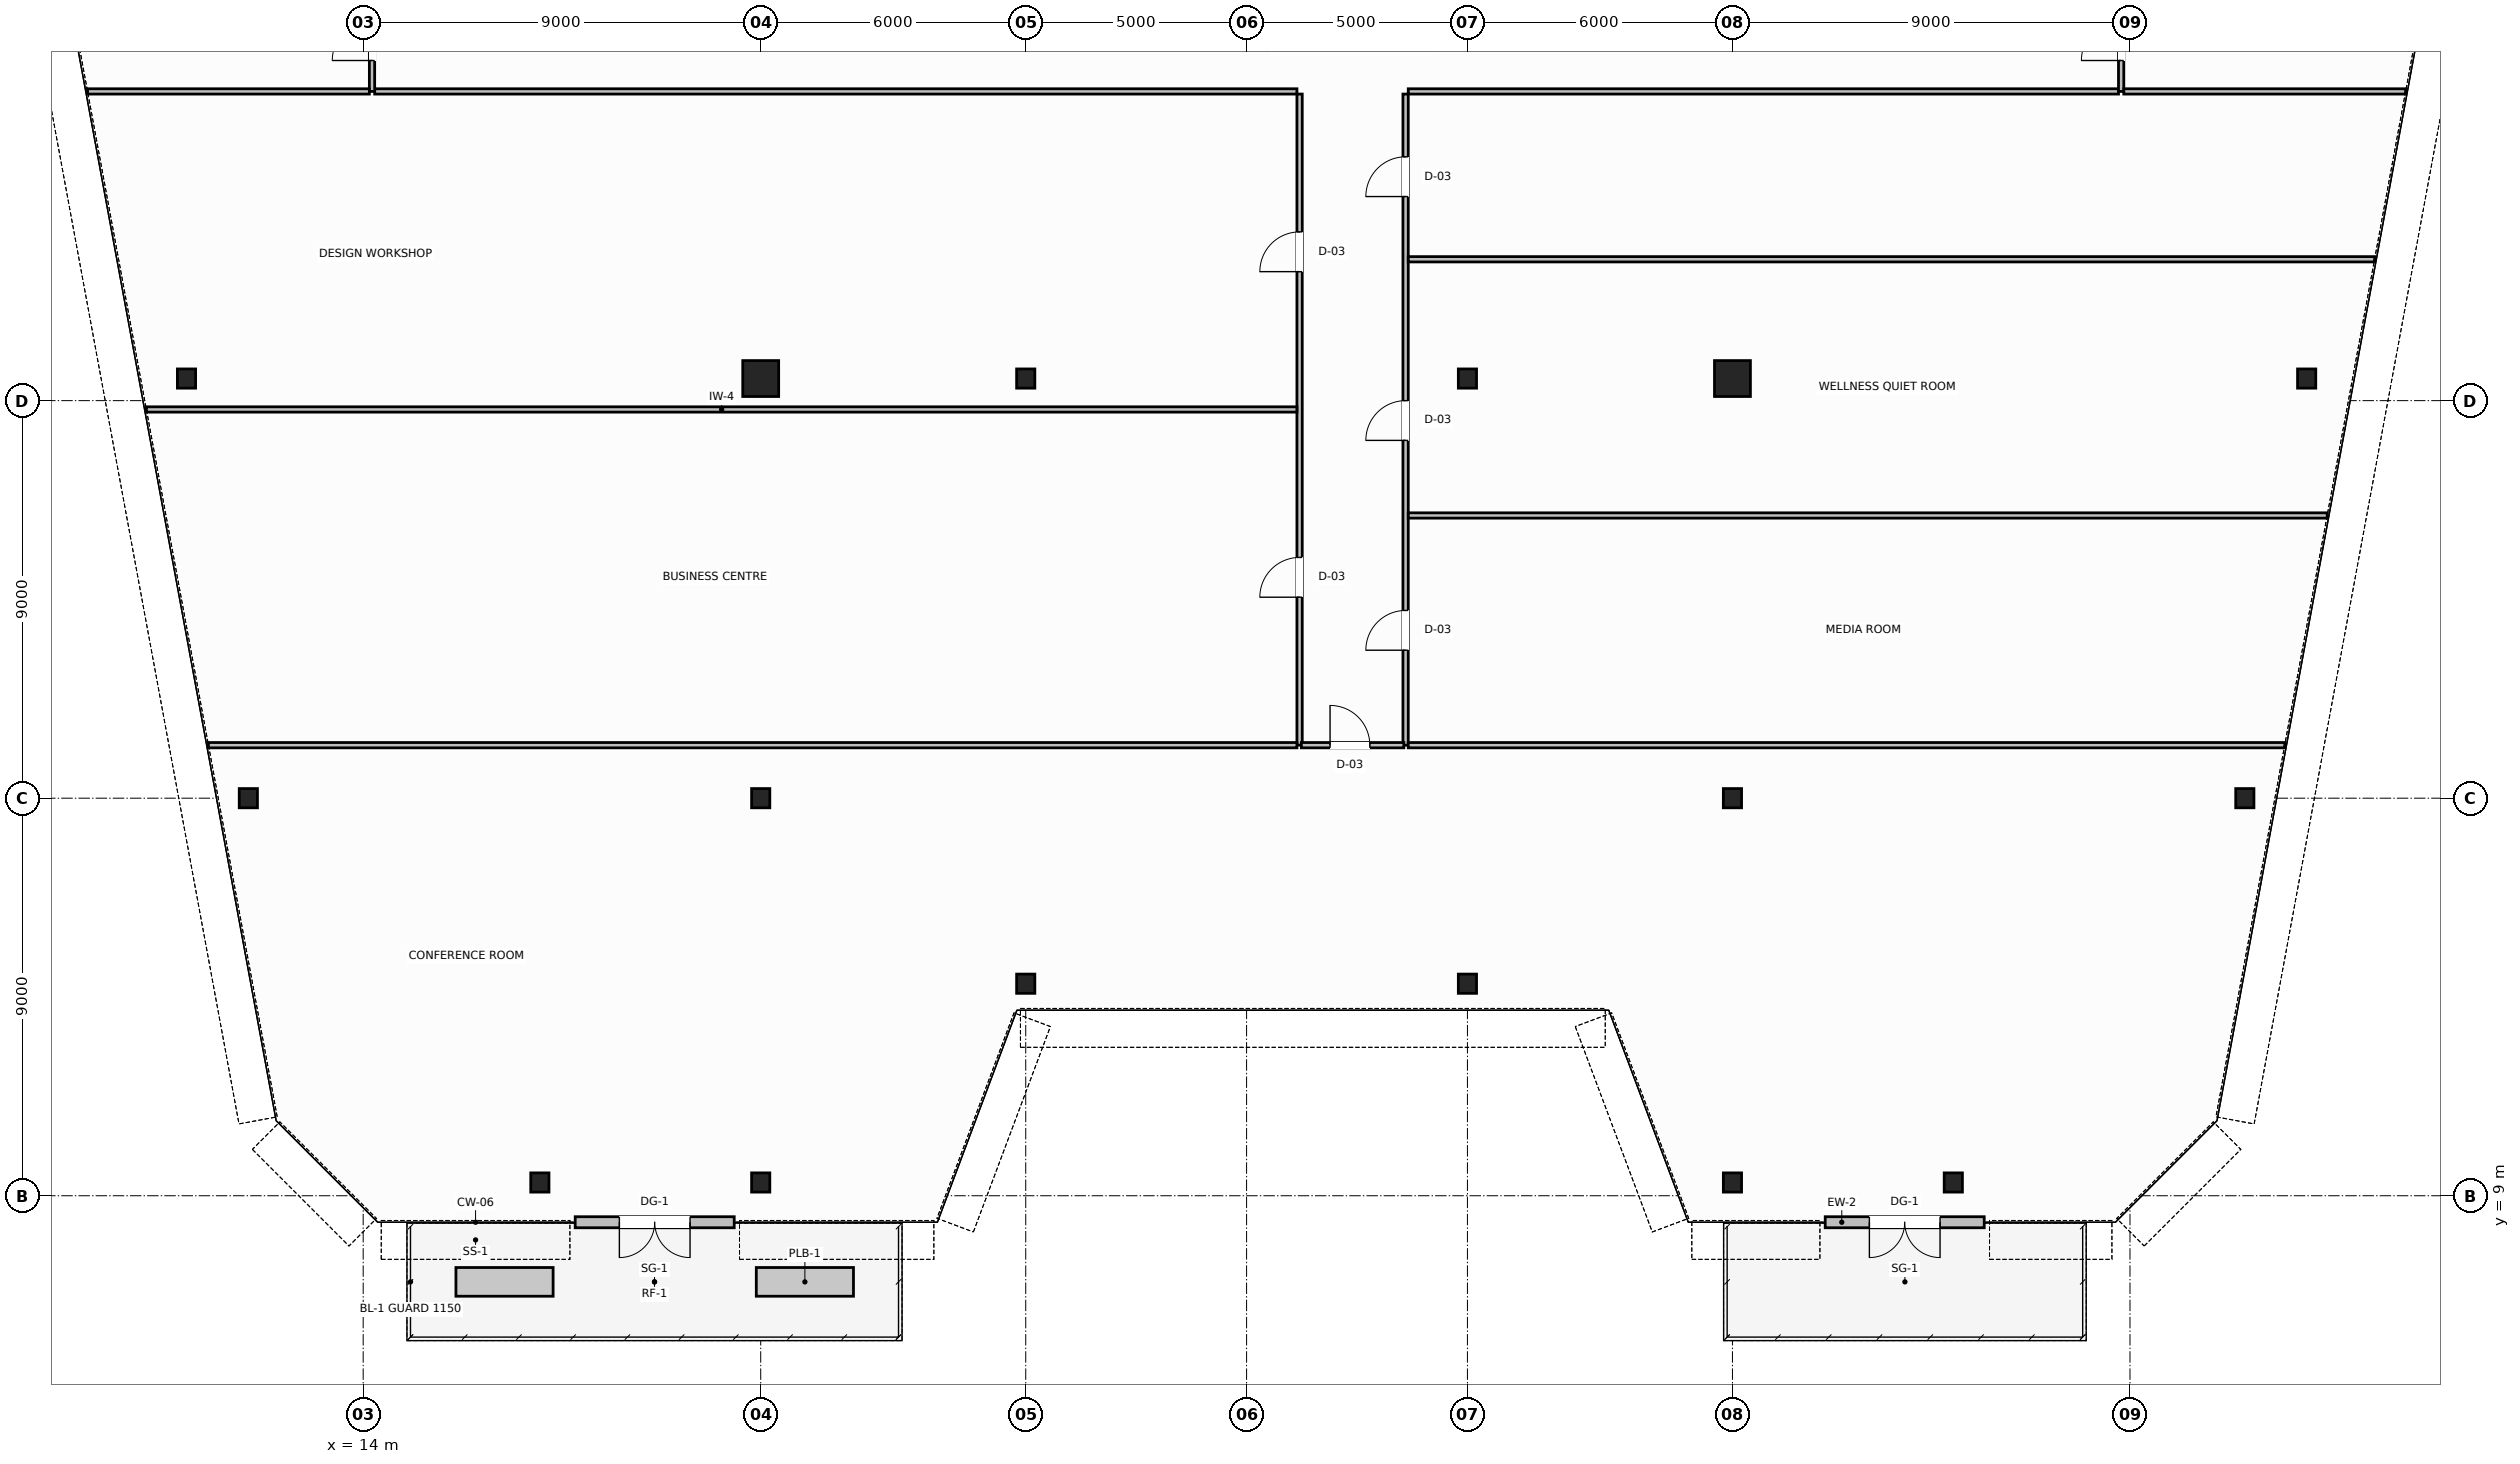
"""IFC4 building model, lengths in metres.
Left out: names, types, materials, properties, quantities, classifications, styles, units other than length and angle.
Written with IfcOpenShell. Run it as: python <this file> out.ifc"""

import sys

from ifc_helpers import new_model, si_unit, direction, frame, frame_2d, origin, origin_2d, place, context, subcontext, project, spatial, rectangle, hollow_circle, i_section, extrude, source, transform, mapped, element, fill, save


model = new_model("IFC4")
c1 = context("Model", 3, precision=1e-05, world=origin(), true_north=direction((0.0, 1.0)))
c2 = subcontext(c1, "Body", "Model", "MODEL_VIEW")
j1 = project(units=[si_unit("LENGTHUNIT", "METRE"), si_unit("PLANEANGLEUNIT", "RADIAN")], contexts=[c1])
p1 = place(None, origin())
s1 = spatial("IfcSite", under=j1, at=p1, CompositionType="ELEMENT")
p2 = place(p1, origin())
s2 = spatial("IfcBuilding", under=s1, at=p2, CompositionType="ELEMENT")
p3 = place(p2, frame((0.0, 0.0, 207.0)))
s3 = spatial("IfcBuildingStorey", under=s2, at=p3, CompositionType="ELEMENT", Elevation=207.0)
m1 = source(origin(), c2, "Body", "SweptSolid", [
    extrude(i_section(OverallWidth=0.412, OverallDepth=0.435, WebThickness=0.036, FlangeThickness=0.05, FilletRadius=0.015, at=origin_2d()), origin(), (0.0, 0.0, 1.0), 3.8),
])
for number, where, z_axis, x_axis in (
    (1, (10.0, 27.5, 0.0), (0.0, 0.0, 1.0), (1.0, 0.0, 0.0)),
    (2, (11.4, 18.0, 0.0), (0.0, 0.0, 1.0), (1.0, 0.0, 0.0)),
    (3, (58.0, 27.5, 0.0), (0.0, 0.0, 1.0), (1.0, 0.0, 0.0)),
    (4, (56.6, 18.0, 0.0), (0.0, 0.0, 1.0), (1.0, 0.0, 0.0)),
):
    element("IfcColumn", number, at=place(p3, frame(where, z_axis=z_axis, x_axis=x_axis)), inside=s3, PredefinedType="COLUMN", context=c2, shape_type="MappedRepresentation", body=[
        mapped(m1, transform((0.0, 0.0, 0.0), scale=1.0)),
    ])
m2 = source(origin(), c2, "Body", "SweptSolid", [
    extrude(hollow_circle(Radius=0.406, WallThickness=0.04, at=origin_2d()), origin(), (0.0, 0.0, 1.0), 3.8),
])
p4 = place(p3, frame((23.0, 27.5, 0.0), z_axis=(0.0, 0.0, 1.0), x_axis=(1.0, 0.0, 0.0)))
e5 = element("IfcColumn", 5, at=p4, inside=s3, PredefinedType="COLUMN", context=c2, shape_type="MappedRepresentation", body=[
    mapped(m2, transform((0.0, 0.0, 0.0), scale=1.0)),
])
m3 = source(origin(), c2, "Body", "SweptSolid", [
    extrude(i_section(OverallWidth=0.412, OverallDepth=0.435, WebThickness=0.036, FlangeThickness=0.05, FilletRadius=0.015, at=origin_2d()), origin(), (0.0, 0.0, 1.0), 3.8),
])
for number, where, z_axis, x_axis in (
    (6, (29.0, 27.5, 0.0), (0.0, 0.0, 1.0), (1.0, 0.0, 0.0)),
    (7, (39.0, 27.5, 0.0), (0.0, 0.0, 1.0), (1.0, 0.0, 0.0)),
):
    element("IfcColumn", number, at=place(p3, frame(where, z_axis=z_axis, x_axis=x_axis)), inside=s3, PredefinedType="COLUMN", context=c2, shape_type="MappedRepresentation", body=[
        mapped(m3, transform((0.0, 0.0, 0.0), scale=1.0)),
    ])
p5 = place(p3, frame((45.0, 27.5, 0.0), z_axis=(0.0, 0.0, 1.0), x_axis=(1.0, 0.0, 0.0)))
e8 = element("IfcColumn", 8, at=p5, inside=s3, PredefinedType="COLUMN", context=c2, shape_type="MappedRepresentation", body=[
    mapped(m2, transform((0.0, 0.0, 0.0), scale=1.0)),
])
for number, where, z_axis, x_axis in (
    (9, (23.0, 18.0, 0.0), (0.0, 0.0, 1.0), (1.0, 0.0, 0.0)),
    (10, (45.0, 18.0, 0.0), (0.0, 0.0, 1.0), (1.0, 0.0, 0.0)),
):
    element("IfcColumn", number, at=place(p3, frame(where, z_axis=z_axis, x_axis=x_axis)), inside=s3, PredefinedType="COLUMN", context=c2, shape_type="MappedRepresentation", body=[
        mapped(m3, transform((0.0, 0.0, 0.0), scale=1.0)),
    ])
m4 = source(origin(), c2, "Body", "SweptSolid", [
    extrude(i_section(OverallWidth=0.412, OverallDepth=0.435, WebThickness=0.036, FlangeThickness=0.05, FilletRadius=0.015, at=origin_2d()), origin(), (0.0, 0.0, 1.0), 4.02),
])
for number, where, z_axis, x_axis in (
    (11, (18.0, 9.3, -0.22), (0.0, 0.0, 1.0), (1.0, 0.0, 0.0)),
    (12, (23.0, 9.3, -0.22), (0.0, 0.0, 1.0), (1.0, 0.0, 0.0)),
    (13, (29.0, 13.8, -0.22), (0.0, 0.0, 1.0), (1.0, 0.0, 0.0)),
    (14, (39.0, 13.8, -0.22), (0.0, 0.0, 1.0), (1.0, 0.0, 0.0)),
    (15, (45.0, 9.3, -0.22), (0.0, 0.0, 1.0), (1.0, 0.0, 0.0)),
    (16, (50.0, 9.3, -0.22), (0.0, 0.0, 1.0), (1.0, 0.0, 0.0)),
):
    element("IfcColumn", number, at=place(p3, frame(where, z_axis=z_axis, x_axis=x_axis)), inside=s3, PredefinedType="COLUMN", context=c2, shape_type="MappedRepresentation", body=[
        mapped(m4, transform((0.0, 0.0, 0.0), scale=1.0)),
    ])
p6 = place(p3, frame((22.4, 8.4, 0.0), z_axis=(0.0, 0.0, 1.0), x_axis=(-1.0, 0.0, 0.0)))
e17 = element("IfcWall", 17, at=p6, inside=s3, PredefinedType="STANDARD", context=c2, shape_type="SweptSolid", body=[
    extrude(rectangle(XDim=3.6, YDim=0.25, at=frame_2d((1.8, 0.0))), origin(), (0.0, 0.0, 1.0), 3.58),
])
p7 = place(p6, frame((1.0, 0.0, 0.0)))
e18 = element("IfcOpeningElement", 18, at=p7, cuts=e17, PredefinedType="OPENING", context=c2, shape_type="SweptSolid", body=[
    extrude(rectangle(XDim=1.6, YDim=2.3, at=frame_2d((0.8, 1.15))), frame((0.0, 0.135, 0.0), z_axis=(0.0, -1.0, 0.0), x_axis=(1.0, 0.0, 0.0)), (0.0, 0.0, 1.0), 0.27),
])
p8 = place(p3, frame((16.1, 7.05, 0.0), z_axis=(0.0, 0.0, 1.0), x_axis=(1.0, 0.0, 0.0)))
e19 = element("IfcWall", 19, at=p8, inside=s3, PredefinedType="PARAPET", context=c2, shape_type="SweptSolid", body=[
    extrude(rectangle(XDim=2.2, YDim=0.65, at=frame_2d((1.1, 0.0))), origin(), (0.0, 0.0, 1.0), 0.65),
])
p9 = place(p3, frame((22.9, 7.05, 0.0), z_axis=(0.0, 0.0, 1.0), x_axis=(1.0, 0.0, 0.0)))
e20 = element("IfcWall", 20, at=p9, inside=s3, PredefinedType="PARAPET", context=c2, shape_type="SweptSolid", body=[
    extrude(rectangle(XDim=2.2, YDim=0.65, at=frame_2d((1.1, 0.0))), origin(), (0.0, 0.0, 1.0), 0.65),
])
p10 = place(p3, frame((50.7, 8.4, 0.0), z_axis=(0.0, 0.0, 1.0), x_axis=(-1.0, 0.0, 0.0)))
e21 = element("IfcWall", 21, at=p10, inside=s3, PredefinedType="STANDARD", context=c2, shape_type="SweptSolid", body=[
    extrude(rectangle(XDim=3.6, YDim=0.25, at=frame_2d((1.8, 0.0))), origin(), (0.0, 0.0, 1.0), 3.58),
])
p11 = place(p10, frame((1.0, 0.0, 0.0)))
e22 = element("IfcOpeningElement", 22, at=p11, cuts=e21, PredefinedType="OPENING", context=c2, shape_type="SweptSolid", body=[
    extrude(rectangle(XDim=1.6, YDim=2.3, at=frame_2d((0.8, 1.15))), frame((0.0, 0.135, 0.0), z_axis=(0.0, -1.0, 0.0), x_axis=(1.0, 0.0, 0.0)), (0.0, 0.0, 1.0), 0.27),
])
p12 = place(p3, frame((14.26, 34.0, 0.0), z_axis=(0.0, 0.0, 1.0), x_axis=(1.0, 0.0, 0.0)))
e23 = element("IfcWall", 23, at=p12, inside=s3, PredefinedType="PARTITIONING", context=c2, shape_type="SweptSolid", body=[
    extrude(rectangle(XDim=20.88, YDim=0.12, at=frame_2d((10.44, 0.0))), origin(), (0.0, 0.0, 1.0), 3.58),
])
p13 = place(p3, frame((37.66, 34.0, 0.0), z_axis=(0.0, 0.0, 1.0), x_axis=(1.0, 0.0, 0.0)))
e24 = element("IfcWall", 24, at=p13, inside=s3, PredefinedType="PARTITIONING", context=c2, shape_type="SweptSolid", body=[
    extrude(rectangle(XDim=16.08, YDim=0.12, at=frame_2d((8.04, 0.0))), origin(), (0.0, 0.0, 1.0), 3.58),
])
p14 = place(p3, frame((14.2, 34.0, 0.0), z_axis=(0.0, 0.0, 1.0), x_axis=(0.0, 1.0, 0.0)))
e25 = element("IfcWall", 25, at=p14, inside=s3, PredefinedType="PARTITIONING", context=c2, shape_type="SweptSolid", body=[
    extrude(rectangle(XDim=2.44, YDim=0.12, at=frame_2d((1.22, 0.0))), origin(), (0.0, 0.0, 1.0), 3.58),
])
p15 = place(p14, frame((0.7, 0.0, 0.0)))
e26 = element("IfcOpeningElement", 26, at=p15, cuts=e25, PredefinedType="OPENING", context=c2, shape_type="SweptSolid", body=[
    extrude(rectangle(XDim=0.9, YDim=2.15, at=frame_2d((0.45, 1.075))), frame((0.0, 0.07, 0.0), z_axis=(0.0, -1.0, 0.0), x_axis=(1.0, 0.0, 0.0)), (0.0, 0.0, 1.0), 0.14),
])
p16 = place(p3, frame((53.8, 34.0, 0.0), z_axis=(0.0, 0.0, 1.0), x_axis=(0.0, 1.0, 0.0)))
e27 = element("IfcWall", 27, at=p16, inside=s3, PredefinedType="PARTITIONING", context=c2, shape_type="SweptSolid", body=[
    extrude(rectangle(XDim=2.44, YDim=0.12, at=frame_2d((1.22, 0.0))), origin(), (0.0, 0.0, 1.0), 3.58),
])
p17 = place(p16, frame((0.7, 0.0, 0.0)))
e28 = element("IfcOpeningElement", 28, at=p17, cuts=e27, PredefinedType="OPENING", context=c2, shape_type="SweptSolid", body=[
    extrude(rectangle(XDim=0.9, YDim=2.15, at=frame_2d((0.45, 1.075))), frame((0.0, 0.07, 0.0), z_axis=(0.0, -1.0, 0.0), x_axis=(1.0, 0.0, 0.0)), (0.0, 0.0, 1.0), 0.14),
])
p18 = place(p3, frame((35.2, 19.2, 0.0), z_axis=(0.0, 0.0, 1.0), x_axis=(0.0, 1.0, 0.0)))
e29 = element("IfcWall", 29, at=p18, inside=s3, PredefinedType="PARTITIONING", context=c2, shape_type="SweptSolid", body=[
    extrude(rectangle(XDim=14.74, YDim=0.12, at=frame_2d((7.37, 0.0))), origin(), (0.0, 0.0, 1.0), 3.58),
])
p19 = place(p18, frame((3.35, 0.0, 0.0)))
e30 = element("IfcOpeningElement", 30, at=p19, cuts=e29, PredefinedType="OPENING", context=c2, shape_type="SweptSolid", body=[
    extrude(rectangle(XDim=0.9, YDim=2.15, at=frame_2d((0.45, 1.075))), frame((0.0, 0.07, 0.0), z_axis=(0.0, -1.0, 0.0), x_axis=(1.0, 0.0, 0.0)), (0.0, 0.0, 1.0), 0.14),
])
p20 = place(p18, frame((10.72, 0.0, 0.0)))
e31 = element("IfcOpeningElement", 31, at=p20, cuts=e29, PredefinedType="OPENING", context=c2, shape_type="SweptSolid", body=[
    extrude(rectangle(XDim=0.9, YDim=2.15, at=frame_2d((0.45, 1.075))), frame((0.0, 0.07, 0.0), z_axis=(0.0, -1.0, 0.0), x_axis=(1.0, 0.0, 0.0)), (0.0, 0.0, 1.0), 0.14),
])
p21 = place(p3, frame((37.6, 19.2, 0.0), z_axis=(0.0, 0.0, 1.0), x_axis=(0.0, 1.0, 0.0)))
e32 = element("IfcWall", 32, at=p21, inside=s3, PredefinedType="PARTITIONING", context=c2, shape_type="SweptSolid", body=[
    extrude(rectangle(XDim=14.74, YDim=0.12, at=frame_2d((7.37, 0.0))), origin(), (0.0, 0.0, 1.0), 3.58),
])
p22 = place(p21, frame((2.15, 0.0, 0.0)))
e33 = element("IfcOpeningElement", 33, at=p22, cuts=e32, PredefinedType="OPENING", context=c2, shape_type="SweptSolid", body=[
    extrude(rectangle(XDim=0.9, YDim=2.15, at=frame_2d((0.45, 1.075))), frame((0.0, 0.07, 0.0), z_axis=(0.0, -1.0, 0.0), x_axis=(1.0, 0.0, 0.0)), (0.0, 0.0, 1.0), 0.14),
])
p23 = place(p21, frame((6.9, 0.0, 0.0)))
e34 = element("IfcOpeningElement", 34, at=p23, cuts=e32, PredefinedType="OPENING", context=c2, shape_type="SweptSolid", body=[
    extrude(rectangle(XDim=0.9, YDim=2.15, at=frame_2d((0.45, 1.075))), frame((0.0, 0.07, 0.0), z_axis=(0.0, -1.0, 0.0), x_axis=(1.0, 0.0, 0.0)), (0.0, 0.0, 1.0), 0.14),
])
p24 = place(p21, frame((12.42, 0.0, 0.0)))
e35 = element("IfcOpeningElement", 35, at=p24, cuts=e32, PredefinedType="OPENING", context=c2, shape_type="SweptSolid", body=[
    extrude(rectangle(XDim=0.9, YDim=2.15, at=frame_2d((0.45, 1.075))), frame((0.0, 0.07, 0.0), z_axis=(0.0, -1.0, 0.0), x_axis=(1.0, 0.0, 0.0)), (0.0, 0.0, 1.0), 0.14),
])
p25 = place(p3, frame((35.24, 19.2, 0.0), z_axis=(0.0, 0.0, 1.0), x_axis=(1.0, 0.0, 0.0)))
e36 = element("IfcWall", 36, at=p25, inside=s3, PredefinedType="PARTITIONING", context=c2, shape_type="SweptSolid", body=[
    extrude(rectangle(XDim=2.32, YDim=0.12, at=frame_2d((1.16, 0.0))), origin(), (0.0, 0.0, 1.0), 3.58),
])
p26 = place(p25, frame((0.65, 0.0, 0.0)))
e37 = element("IfcOpeningElement", 37, at=p26, cuts=e36, PredefinedType="OPENING", context=c2, shape_type="SweptSolid", body=[
    extrude(rectangle(XDim=0.9, YDim=2.15, at=frame_2d((0.45, 1.075))), frame((0.0, 0.07, 0.0), z_axis=(0.0, -1.0, 0.0), x_axis=(1.0, 0.0, 0.0)), (0.0, 0.0, 1.0), 0.14),
])
for number, where, z_axis, x_axis in (
    (38, (7.759, 34.0, 0.0), (0.0, 0.0, 1.0), (1.0, 0.0, 0.0)),
    (39, (53.86, 34.0, 0.0), (0.0, 0.0, 1.0), (1.0, 0.0, 0.0)),
):
    element("IfcWall", number, at=place(p3, frame(where, z_axis=z_axis, x_axis=x_axis)), inside=s3, PredefinedType="PARTITIONING", context=c2, shape_type="SweptSolid", body=[
        extrude(rectangle(XDim=6.381, YDim=0.12, at=frame_2d((3.19, 0.0))), origin(), (0.0, 0.0, 1.0), 3.58),
    ])
p27 = place(p3, frame((9.091, 26.8, 0.0), z_axis=(0.0, 0.0, 1.0), x_axis=(1.0, 0.0, 0.0)))
e40 = element("IfcWall", 40, at=p27, inside=s3, PredefinedType="PARTITIONING", context=c2, shape_type="SweptSolid", body=[
    extrude(rectangle(XDim=26.049, YDim=0.12, at=frame_2d((13.024, 0.0))), origin(), (0.0, 0.0, 1.0), 3.58),
])
p28 = place(p3, frame((37.66, 24.4, 0.0), z_axis=(0.0, 0.0, 1.0), x_axis=(1.0, 0.0, 0.0)))
e41 = element("IfcWall", 41, at=p28, inside=s3, PredefinedType="PARTITIONING", context=c2, shape_type="SweptSolid", body=[
    extrude(rectangle(XDim=20.805, YDim=0.12, at=frame_2d((10.403, 0.0))), origin(), (0.0, 0.0, 1.0), 3.17),
])
p29 = place(p3, frame((37.66, 30.2, 0.0), z_axis=(0.0, 0.0, 1.0), x_axis=(1.0, 0.0, 0.0)))
e42 = element("IfcWall", 42, at=p29, inside=s3, PredefinedType="PARTITIONING", context=c2, shape_type="SweptSolid", body=[
    extrude(rectangle(XDim=21.878, YDim=0.12, at=frame_2d((10.939, 0.0))), origin(), (0.0, 0.0, 1.0), 3.17),
])
p30 = place(p3, frame((10.497, 19.2, 0.0), z_axis=(0.0, 0.0, 1.0), x_axis=(1.0, 0.0, 0.0)))
e43 = element("IfcWall", 43, at=p30, inside=s3, PredefinedType="PARTITIONING", context=c2, shape_type="SweptSolid", body=[
    extrude(rectangle(XDim=24.643, YDim=0.12, at=frame_2d((12.322, 0.0))), origin(), (0.0, 0.0, 1.0), 3.58),
])
p31 = place(p3, frame((37.66, 19.2, 0.0), z_axis=(0.0, 0.0, 1.0), x_axis=(1.0, 0.0, 0.0)))
e44 = element("IfcWall", 44, at=p31, inside=s3, PredefinedType="PARTITIONING", context=c2, shape_type="SweptSolid", body=[
    extrude(rectangle(XDim=19.844, YDim=0.12, at=frame_2d((9.922, 0.0))), origin(), (0.0, 0.0, 1.0), 3.58),
])
m5 = source(origin(), c2, "Body", "SweptSolid", [
    extrude(rectangle(XDim=1.6, YDim=2.3, at=frame_2d((0.8, 1.15))), frame((0.0, 0.025, 0.0), z_axis=(0.0, -1.0, 0.0), x_axis=(1.0, 0.0, 0.0)), (0.0, 0.0, 1.0), 0.05),
])
p32 = place(p7, origin())
e45 = element("IfcDoor", 45, at=p32, inside=s3, OperationType="DOUBLE_DOOR_SINGLE_SWING", PredefinedType="DOOR", context=c2, shape_type="MappedRepresentation", body=[
    mapped(m5, transform((0.0, 0.0, 0.0), scale=1.0)),
])
fill(e18, e45)
p33 = place(p11, origin())
e46 = element("IfcDoor", 46, at=p33, inside=s3, OperationType="DOUBLE_DOOR_SINGLE_SWING", PredefinedType="DOOR", context=c2, shape_type="MappedRepresentation", body=[
    mapped(m5, transform((0.0, 0.0, 0.0), scale=1.0)),
])
fill(e22, e46)
m6 = source(origin(), c2, "Body", "SweptSolid", [
    extrude(rectangle(XDim=0.9, YDim=2.15, at=frame_2d((0.45, 1.075))), frame((0.0, 0.025, 0.0), z_axis=(0.0, -1.0, 0.0), x_axis=(1.0, 0.0, 0.0)), (0.0, 0.0, 1.0), 0.05),
])
p34 = place(p15, origin())
e47 = element("IfcDoor", 47, at=p34, inside=s3, OperationType="SINGLE_SWING_LEFT", PredefinedType="DOOR", context=c2, shape_type="MappedRepresentation", body=[
    mapped(m6, transform((0.0, 0.0, 0.0), scale=1.0)),
])
fill(e26, e47)
p35 = place(p17, origin())
e48 = element("IfcDoor", 48, at=p35, inside=s3, OperationType="SINGLE_SWING_RIGHT", PredefinedType="DOOR", context=c2, shape_type="MappedRepresentation", body=[
    mapped(m6, transform((0.0, 0.0, 0.0), scale=1.0)),
])
fill(e28, e48)
p36 = place(p19, origin())
e49 = element("IfcDoor", 49, at=p36, inside=s3, OperationType="SINGLE_SWING_LEFT", PredefinedType="DOOR", context=c2, shape_type="MappedRepresentation", body=[
    mapped(m6, transform((0.0, 0.0, 0.0), scale=1.0)),
])
fill(e30, e49)
p37 = place(p20, origin())
e50 = element("IfcDoor", 50, at=p37, inside=s3, OperationType="SINGLE_SWING_RIGHT", PredefinedType="DOOR", context=c2, shape_type="MappedRepresentation", body=[
    mapped(m6, transform((0.0, 0.0, 0.0), scale=1.0)),
])
fill(e31, e50)
p38 = place(p22, origin())
e51 = element("IfcDoor", 51, at=p38, inside=s3, OperationType="SINGLE_SWING_RIGHT", PredefinedType="DOOR", context=c2, shape_type="MappedRepresentation", body=[
    mapped(m6, transform((0.0, 0.0, 0.0), scale=1.0)),
])
fill(e33, e51)
p39 = place(p23, origin())
e52 = element("IfcDoor", 52, at=p39, inside=s3, OperationType="SINGLE_SWING_LEFT", PredefinedType="DOOR", context=c2, shape_type="MappedRepresentation", body=[
    mapped(m6, transform((0.0, 0.0, 0.0), scale=1.0)),
])
fill(e34, e52)
p40 = place(p24, origin())
e53 = element("IfcDoor", 53, at=p40, inside=s3, OperationType="SINGLE_SWING_RIGHT", PredefinedType="DOOR", context=c2, shape_type="MappedRepresentation", body=[
    mapped(m6, transform((0.0, 0.0, 0.0), scale=1.0)),
])
fill(e35, e53)
p41 = place(p26, origin())
e54 = element("IfcDoor", 54, at=p41, inside=s3, OperationType="SINGLE_SWING_LEFT", PredefinedType="DOOR", context=c2, shape_type="MappedRepresentation", body=[
    mapped(m6, transform((0.0, 0.0, 0.0), scale=1.0)),
])
fill(e37, e54)
save(model, sys.argv[1])
